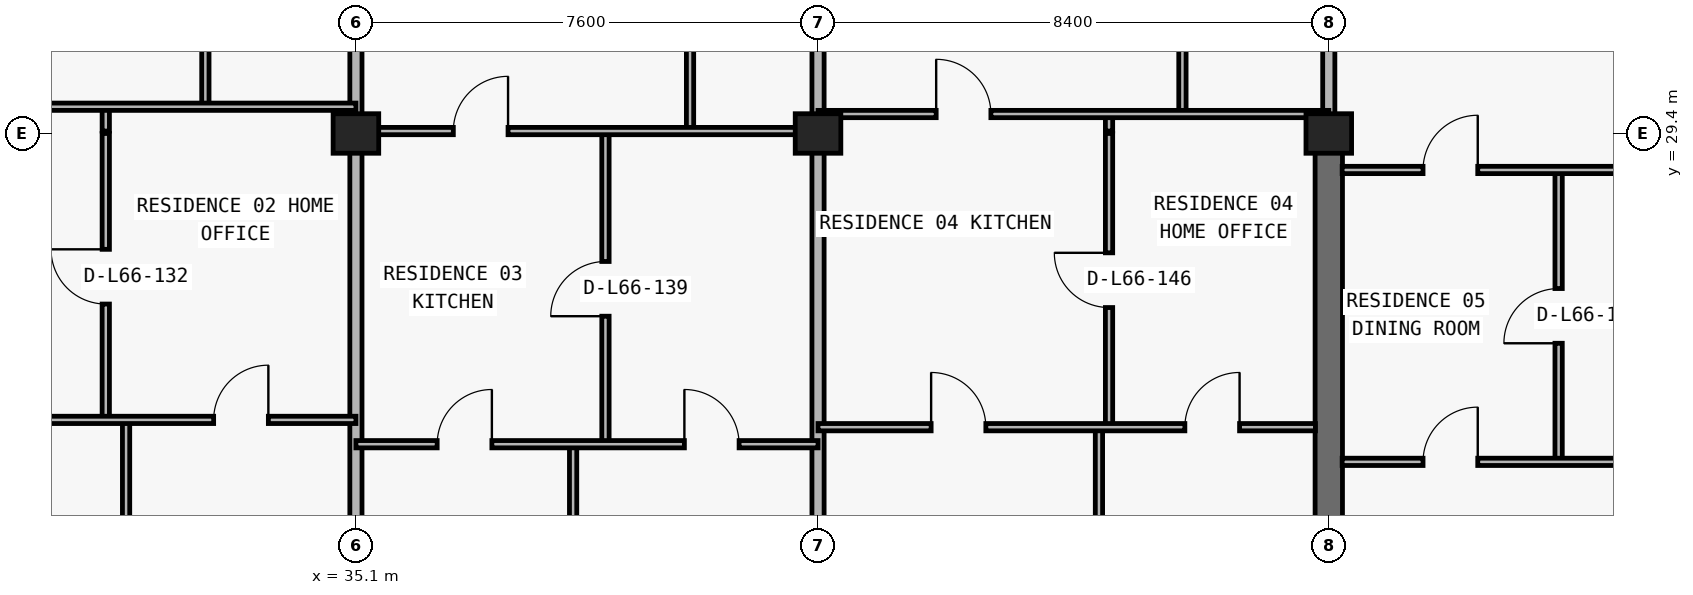
"""IFC4 building model, lengths in metres.
Left out: names, types, materials, properties, quantities, classifications, styles, units other than length and angle.
Written with IfcOpenShell. Run it as: python <this file> out.ifc"""

import sys

from ifc_helpers import new_model, si_unit, direction, frame, frame_2d, origin, origin_2d, place, context, subcontext, project, spatial, rectangle, extrude, element, fill, save


model = new_model("IFC4")
c1 = context("Model", 3, precision=1e-05, world=origin(), true_north=direction((0.0, 1.0)))
c2 = subcontext(c1, "Body", "Model", "MODEL_VIEW")
j1 = project(units=[si_unit("LENGTHUNIT", "METRE"), si_unit("PLANEANGLEUNIT", "RADIAN")], contexts=[c1])
p1 = place(None, origin())
s1 = spatial("IfcSite", under=j1, at=p1, CompositionType="ELEMENT")
p2 = place(p1, origin())
s2 = spatial("IfcBuilding", under=s1, at=p2, CompositionType="ELEMENT")
p3 = place(p2, frame((0.0, 0.0, 236.4)))
s3 = spatial("IfcBuildingStorey", under=s2, at=p3, CompositionType="ELEMENT", Elevation=236.4)
for number, where, z_axis, x_axis in (
    (1, (35.1, 29.4, 0.0), (0.0, 0.0, 1.0), (1.0, 0.0, 0.0)),
    (2, (42.7, 29.4, 0.0), (0.0, 0.0, 1.0), (1.0, 0.0, 0.0)),
    (3, (51.1, 29.4, 0.0), (0.0, 0.0, 1.0), (1.0, 0.0, 0.0)),
):
    element("IfcColumn", number, at=place(p3, frame(where, z_axis=z_axis, x_axis=x_axis)), inside=s3, PredefinedType="COLUMN", context=c2, shape_type="SweptSolid", body=[
        extrude(rectangle(XDim=0.75, YDim=0.65, at=origin_2d()), origin(), (0.0, 0.0, 1.0), 3.05),
    ])
p4 = place(p3, frame((51.1, 20.8, 0.0), z_axis=(0.0, 0.0, 1.0), x_axis=(0.0, 1.0, 0.0)))
e4 = element("IfcWall", 4, at=p4, inside=s3, PredefinedType="SHEAR", context=c2, shape_type="SweptSolid", body=[
    extrude(rectangle(XDim=8.6, YDim=0.45, at=frame_2d((4.3, 0.0))), origin(), (0.0, 0.0, 1.0), 3.05),
])
p5 = place(p3, frame((30.986, 24.69, 0.0), z_axis=(0.0, 0.0, 1.0), x_axis=(0.0, 1.0, 0.0)))
e5 = element("IfcWall", 5, at=p5, inside=s3, PredefinedType="PARTITIONING", context=c2, shape_type="SweptSolid", body=[
    extrude(rectangle(XDim=4.71, YDim=0.12, at=frame_2d((2.355, 0.0))), origin(), (0.0, 0.0, 1.0), 3.05),
])
p6 = place(p5, frame((1.905, 0.0, 0.0)))
e6 = element("IfcOpeningElement", 6, at=p6, cuts=e5, PredefinedType="OPENING", context=c2, shape_type="SweptSolid", body=[
    extrude(rectangle(XDim=0.9, YDim=2.15, at=frame_2d((0.45, 1.075))), frame((0.0, 0.07, 0.0), z_axis=(0.0, -1.0, 0.0), x_axis=(1.0, 0.0, 0.0)), (0.0, 0.0, 1.0), 0.14),
])
p7 = place(p3, frame((30.986, 29.44, 0.0), z_axis=(0.0, 0.0, 1.0), x_axis=(0.0, 1.0, 0.0)))
e7 = element("IfcWall", 7, at=p7, inside=s3, PredefinedType="PARTITIONING", context=c2, shape_type="SweptSolid", body=[
    extrude(rectangle(XDim=0.4, YDim=0.12, at=frame_2d((0.2, 0.0))), origin(), (0.0, 0.0, 1.0), 2.725),
])
p8 = place(p3, frame((31.32, 13.34, 0.0), z_axis=(0.0, 0.0, 1.0), x_axis=(0.0, 1.0, 0.0)))
e8 = element("IfcWall", 8, at=p8, inside=s3, PredefinedType="PARTITIONING", context=c2, shape_type="SweptSolid", body=[
    extrude(rectangle(XDim=11.35, YDim=0.12, at=frame_2d((5.675, 0.0))), origin(), (0.0, 0.0, 1.0), 3.05),
])
p9 = place(p3, frame((32.624, 29.84, 0.0), z_axis=(0.0, 0.0, 1.0), x_axis=(0.0, 1.0, 0.0)))
e9 = element("IfcWall", 9, at=p9, inside=s3, PredefinedType="PARTITIONING", context=c2, shape_type="SweptSolid", body=[
    extrude(rectangle(XDim=4.16, YDim=0.12, at=frame_2d((2.08, 0.0))), origin(), (0.0, 0.0, 1.0), 3.05),
])
p10 = place(p9, frame((1.655, 0.0, 0.0)))
e10 = element("IfcOpeningElement", 10, at=p10, cuts=e9, PredefinedType="OPENING", context=c2, shape_type="SweptSolid", body=[
    extrude(rectangle(XDim=0.85, YDim=2.1, at=frame_2d((0.425, 1.05))), frame((0.0, 0.07, 0.0), z_axis=(0.0, -1.0, 0.0), x_axis=(1.0, 0.0, 0.0)), (0.0, 0.0, 1.0), 0.14),
])
p11 = place(p3, frame((35.1, 13.34, 0.0), z_axis=(0.0, 0.0, 1.0), x_axis=(0.0, 1.0, 0.0)))
e11 = element("IfcWall", 11, at=p11, inside=s3, PredefinedType="PARTITIONING", context=c2, shape_type="SweptSolid", body=[
    extrude(rectangle(XDim=16.06, YDim=0.2, at=frame_2d((8.03, 0.0))), origin(), (0.0, 0.0, 1.0), 2.263),
])
p12 = place(p3, frame((35.1, 29.44, 0.0), z_axis=(0.0, 0.0, 1.0), x_axis=(0.0, 1.0, 0.0)))
e12 = element("IfcWall", 12, at=p12, inside=s3, PredefinedType="PARTITIONING", context=c2, shape_type="SweptSolid", body=[
    extrude(rectangle(XDim=4.56, YDim=0.2, at=frame_2d((2.28, 0.0))), origin(), (0.0, 0.0, 1.0), 2.263),
])
p13 = place(p3, frame((38.672, 13.34, 0.0), z_axis=(0.0, 0.0, 1.0), x_axis=(0.0, 1.0, 0.0)))
e13 = element("IfcWall", 13, at=p13, inside=s3, PredefinedType="PARTITIONING", context=c2, shape_type="SweptSolid", body=[
    extrude(rectangle(XDim=10.95, YDim=0.12, at=frame_2d((5.475, 0.0))), origin(), (0.0, 0.0, 1.0), 3.05),
])
p14 = place(p3, frame((39.204, 24.29, 0.0), z_axis=(0.0, 0.0, 1.0), x_axis=(0.0, 1.0, 0.0)))
e14 = element("IfcWall", 14, at=p14, inside=s3, PredefinedType="PARTITIONING", context=c2, shape_type="SweptSolid", body=[
    extrude(rectangle(XDim=5.11, YDim=0.12, at=frame_2d((2.555, 0.0))), origin(), (0.0, 0.0, 1.0), 3.05),
])
p15 = place(p14, frame((2.105, 0.0, 0.0)))
e15 = element("IfcOpeningElement", 15, at=p15, cuts=e14, PredefinedType="OPENING", context=c2, shape_type="SweptSolid", body=[
    extrude(rectangle(XDim=0.9, YDim=2.15, at=frame_2d((0.45, 1.075))), frame((0.0, 0.07, 0.0), z_axis=(0.0, -1.0, 0.0), x_axis=(1.0, 0.0, 0.0)), (0.0, 0.0, 1.0), 0.14),
])
p16 = place(p3, frame((40.595, 29.44, 0.0), z_axis=(0.0, 0.0, 1.0), x_axis=(0.0, 1.0, 0.0)))
e16 = element("IfcWall", 16, at=p16, inside=s3, PredefinedType="PARTITIONING", context=c2, shape_type="SweptSolid", body=[
    extrude(rectangle(XDim=4.56, YDim=0.12, at=frame_2d((2.28, 0.0))), origin(), (0.0, 0.0, 1.0), 3.05),
])
p17 = place(p16, frame((1.855, 0.0, 0.0)))
e17 = element("IfcOpeningElement", 17, at=p17, cuts=e16, PredefinedType="OPENING", context=c2, shape_type="SweptSolid", body=[
    extrude(rectangle(XDim=0.85, YDim=2.1, at=frame_2d((0.425, 1.05))), frame((0.0, 0.07, 0.0), z_axis=(0.0, -1.0, 0.0), x_axis=(1.0, 0.0, 0.0)), (0.0, 0.0, 1.0), 0.14),
])
p18 = place(p3, frame((42.7, 13.34, 0.0), z_axis=(0.0, 0.0, 1.0), x_axis=(0.0, 1.0, 0.0)))
e18 = element("IfcWall", 18, at=p18, inside=s3, PredefinedType="PARTITIONING", context=c2, shape_type="SweptSolid", body=[
    extrude(rectangle(XDim=16.06, YDim=0.2, at=frame_2d((8.03, 0.0))), origin(), (0.0, 0.0, 1.0), 2.263),
])
p19 = place(p3, frame((42.7, 29.44, 0.0), z_axis=(0.0, 0.0, 1.0), x_axis=(0.0, 1.0, 0.0)))
e19 = element("IfcWall", 19, at=p19, inside=s3, PredefinedType="PARTITIONING", context=c2, shape_type="SweptSolid", body=[
    extrude(rectangle(XDim=4.56, YDim=0.2, at=frame_2d((2.28, 0.0))), origin(), (0.0, 0.0, 1.0), 2.263),
])
p20 = place(p3, frame((47.32, 13.34, 0.0), z_axis=(0.0, 0.0, 1.0), x_axis=(0.0, 1.0, 0.0)))
e20 = element("IfcWall", 20, at=p20, inside=s3, PredefinedType="PARTITIONING", context=c2, shape_type="SweptSolid", body=[
    extrude(rectangle(XDim=11.23, YDim=0.12, at=frame_2d((5.615, 0.0))), origin(), (0.0, 0.0, 1.0), 3.05),
])
p21 = place(p3, frame((47.486, 24.575, 0.0), z_axis=(0.0, 0.0, 1.0), x_axis=(0.0, 1.0, 0.0)))
e21 = element("IfcWall", 21, at=p21, inside=s3, PredefinedType="PARTITIONING", context=c2, shape_type="SweptSolid", body=[
    extrude(rectangle(XDim=4.825, YDim=0.12, at=frame_2d((2.413, 0.0))), origin(), (0.0, 0.0, 1.0), 3.05),
])
p22 = place(p21, frame((1.962, 0.0, 0.0)))
e22 = element("IfcOpeningElement", 22, at=p22, cuts=e21, PredefinedType="OPENING", context=c2, shape_type="SweptSolid", body=[
    extrude(rectangle(XDim=0.9, YDim=2.15, at=frame_2d((0.45, 1.075))), frame((0.0, 0.07, 0.0), z_axis=(0.0, -1.0, 0.0), x_axis=(1.0, 0.0, 0.0)), (0.0, 0.0, 1.0), 0.14),
])
p23 = place(p3, frame((47.486, 29.44, 0.0), z_axis=(0.0, 0.0, 1.0), x_axis=(0.0, 1.0, 0.0)))
e23 = element("IfcWall", 23, at=p23, inside=s3, PredefinedType="PARTITIONING", context=c2, shape_type="SweptSolid", body=[
    extrude(rectangle(XDim=0.28, YDim=0.12, at=frame_2d((0.14, 0.0))), origin(), (0.0, 0.0, 1.0), 3.05),
])
p24 = place(p3, frame((48.693, 29.72, 0.0), z_axis=(0.0, 0.0, 1.0), x_axis=(0.0, 1.0, 0.0)))
e24 = element("IfcWall", 24, at=p24, inside=s3, PredefinedType="PARTITIONING", context=c2, shape_type="SweptSolid", body=[
    extrude(rectangle(XDim=4.28, YDim=0.12, at=frame_2d((2.14, 0.0))), origin(), (0.0, 0.0, 1.0), 3.05),
])
p25 = place(p24, frame((1.715, 0.0, 0.0)))
e25 = element("IfcOpeningElement", 25, at=p25, cuts=e24, PredefinedType="OPENING", context=c2, shape_type="SweptSolid", body=[
    extrude(rectangle(XDim=0.85, YDim=2.1, at=frame_2d((0.425, 1.05))), frame((0.0, 0.07, 0.0), z_axis=(0.0, -1.0, 0.0), x_axis=(1.0, 0.0, 0.0)), (0.0, 0.0, 1.0), 0.14),
])
p26 = place(p3, frame((51.1, 29.44, 0.0), z_axis=(0.0, 0.0, 1.0), x_axis=(0.0, 1.0, 0.0)))
e26 = element("IfcWall", 26, at=p26, inside=s3, PredefinedType="PARTITIONING", context=c2, shape_type="SweptSolid", body=[
    extrude(rectangle(XDim=4.56, YDim=0.2, at=frame_2d((2.28, 0.0))), origin(), (0.0, 0.0, 1.0), 2.335),
])
p27 = place(p3, frame((54.88, 24.0, 0.0), z_axis=(0.0, 0.0, 1.0), x_axis=(0.0, 1.0, 0.0)))
e27 = element("IfcWall", 27, at=p27, inside=s3, PredefinedType="PARTITIONING", context=c2, shape_type="SweptSolid", body=[
    extrude(rectangle(XDim=4.8, YDim=0.12, at=frame_2d((2.4, 0.0))), origin(), (0.0, 0.0, 1.0), 3.05),
])
p28 = place(p27, frame((1.95, 0.0, 0.0)))
e28 = element("IfcOpeningElement", 28, at=p28, cuts=e27, PredefinedType="OPENING", context=c2, shape_type="SweptSolid", body=[
    extrude(rectangle(XDim=0.9, YDim=2.15, at=frame_2d((0.45, 1.075))), frame((0.0, 0.07, 0.0), z_axis=(0.0, -1.0, 0.0), x_axis=(1.0, 0.0, 0.0)), (0.0, 0.0, 1.0), 0.14),
])
p29 = place(p3, frame((51.32, 24.0, 0.0), z_axis=(0.0, 0.0, 1.0), x_axis=(1.0, 0.0, 0.0)))
e29 = element("IfcWall", 29, at=p29, inside=s3, PredefinedType="PARTITIONING", context=c2, shape_type="SweptSolid", body=[
    extrude(rectangle(XDim=8.18, YDim=0.12, at=frame_2d((4.09, 0.0))), origin(), (0.0, 0.0, 1.0), 3.05),
])
p30 = place(p29, frame((1.33, 0.0, 0.0)))
e30 = element("IfcOpeningElement", 30, at=p30, cuts=e29, PredefinedType="OPENING", context=c2, shape_type="SweptSolid", body=[
    extrude(rectangle(XDim=0.9, YDim=2.15, at=frame_2d((0.45, 1.075))), frame((0.0, 0.07, 0.0), z_axis=(0.0, -1.0, 0.0), x_axis=(1.0, 0.0, 0.0)), (0.0, 0.0, 1.0), 0.14),
])
p31 = place(p3, frame((35.1, 24.29, 0.0), z_axis=(0.0, 0.0, 1.0), x_axis=(1.0, 0.0, 0.0)))
e31 = element("IfcWall", 31, at=p31, inside=s3, PredefinedType="PARTITIONING", context=c2, shape_type="SweptSolid", body=[
    extrude(rectangle(XDim=7.6, YDim=0.12, at=frame_2d((3.8, 0.0))), origin(), (0.0, 0.0, 1.0), 3.05),
])
p32 = place(p31, frame((1.336, 0.0, 0.0)))
e32 = element("IfcOpeningElement", 32, at=p32, cuts=e31, PredefinedType="OPENING", context=c2, shape_type="SweptSolid", body=[
    extrude(rectangle(XDim=0.9, YDim=2.15, at=frame_2d((0.45, 1.075))), frame((0.0, 0.07, 0.0), z_axis=(0.0, -1.0, 0.0), x_axis=(1.0, 0.0, 0.0)), (0.0, 0.0, 1.0), 0.14),
])
p33 = place(p31, frame((5.402, 0.0, 0.0)))
e33 = element("IfcOpeningElement", 33, at=p33, cuts=e31, PredefinedType="OPENING", context=c2, shape_type="SweptSolid", body=[
    extrude(rectangle(XDim=0.9, YDim=2.15, at=frame_2d((0.45, 1.075))), frame((0.0, 0.07, 0.0), z_axis=(0.0, -1.0, 0.0), x_axis=(1.0, 0.0, 0.0)), (0.0, 0.0, 1.0), 0.14),
])
p34 = place(p3, frame((42.7, 24.57, 0.0), z_axis=(0.0, 0.0, 1.0), x_axis=(1.0, 0.0, 0.0)))
e34 = element("IfcWall", 34, at=p34, inside=s3, PredefinedType="PARTITIONING", context=c2, shape_type="SweptSolid", body=[
    extrude(rectangle(XDim=8.18, YDim=0.12, at=frame_2d((4.09, 0.0))), origin(), (0.0, 0.0, 1.0), 3.05),
])
p35 = place(p34, frame((1.86, 0.0, 0.0)))
e35 = element("IfcOpeningElement", 35, at=p35, cuts=e34, PredefinedType="OPENING", context=c2, shape_type="SweptSolid", body=[
    extrude(rectangle(XDim=0.9, YDim=2.15, at=frame_2d((0.45, 1.075))), frame((0.0, 0.07, 0.0), z_axis=(0.0, -1.0, 0.0), x_axis=(1.0, 0.0, 0.0)), (0.0, 0.0, 1.0), 0.14),
])
p36 = place(p34, frame((6.033, 0.0, 0.0)))
e36 = element("IfcOpeningElement", 36, at=p36, cuts=e34, PredefinedType="OPENING", context=c2, shape_type="SweptSolid", body=[
    extrude(rectangle(XDim=0.9, YDim=2.15, at=frame_2d((0.45, 1.075))), frame((0.0, 0.07, 0.0), z_axis=(0.0, -1.0, 0.0), x_axis=(1.0, 0.0, 0.0)), (0.0, 0.0, 1.0), 0.14),
])
p37 = place(p3, frame((26.92, 24.69, 0.0), z_axis=(0.0, 0.0, 1.0), x_axis=(1.0, 0.0, 0.0)))
e37 = element("IfcWall", 37, at=p37, inside=s3, PredefinedType="PARTITIONING", context=c2, shape_type="SweptSolid", body=[
    extrude(rectangle(XDim=8.18, YDim=0.12, at=frame_2d((4.09, 0.0))), origin(), (0.0, 0.0, 1.0), 3.05),
])
p38 = place(p37, frame((1.583, 0.0, 0.0)))
e38 = element("IfcOpeningElement", 38, at=p38, cuts=e37, PredefinedType="OPENING", context=c2, shape_type="SweptSolid", body=[
    extrude(rectangle(XDim=0.9, YDim=2.15, at=frame_2d((0.45, 1.075))), frame((0.0, 0.07, 0.0), z_axis=(0.0, -1.0, 0.0), x_axis=(1.0, 0.0, 0.0)), (0.0, 0.0, 1.0), 0.14),
])
p39 = place(p37, frame((5.84, 0.0, 0.0)))
e39 = element("IfcOpeningElement", 39, at=p39, cuts=e37, PredefinedType="OPENING", context=c2, shape_type="SweptSolid", body=[
    extrude(rectangle(XDim=0.9, YDim=2.15, at=frame_2d((0.45, 1.075))), frame((0.0, 0.07, 0.0), z_axis=(0.0, -1.0, 0.0), x_axis=(1.0, 0.0, 0.0)), (0.0, 0.0, 1.0), 0.14),
])
p40 = place(p3, frame((51.32, 28.8, 0.0), z_axis=(0.0, 0.0, 1.0), x_axis=(1.0, 0.0, 0.0)))
e40 = element("IfcWall", 40, at=p40, inside=s3, PredefinedType="PARTITIONING", context=c2, shape_type="SweptSolid", body=[
    extrude(rectangle(XDim=8.175, YDim=0.12, at=frame_2d((4.087, 0.0))), origin(), (0.0, 0.0, 1.0), 3.05),
])
p41 = place(p40, frame((1.33, 0.0, 0.0)))
e41 = element("IfcOpeningElement", 41, at=p41, cuts=e40, PredefinedType="OPENING", context=c2, shape_type="SweptSolid", body=[
    extrude(rectangle(XDim=0.9, YDim=2.15, at=frame_2d((0.45, 1.075))), frame((0.0, 0.07, 0.0), z_axis=(0.0, -1.0, 0.0), x_axis=(1.0, 0.0, 0.0)), (0.0, 0.0, 1.0), 0.14),
])
p42 = place(p3, frame((35.1, 29.44, 0.0), z_axis=(0.0, 0.0, 1.0), x_axis=(1.0, 0.0, 0.0)))
e42 = element("IfcWall", 42, at=p42, inside=s3, PredefinedType="PARTITIONING", context=c2, shape_type="SweptSolid", body=[
    extrude(rectangle(XDim=7.6, YDim=0.12, at=frame_2d((3.8, 0.0))), origin(), (0.0, 0.0, 1.0), 2.263),
])
p43 = place(p42, frame((1.602, 0.0, 0.0)))
e43 = element("IfcOpeningElement", 43, at=p43, cuts=e42, PredefinedType="OPENING", context=c2, shape_type="SweptSolid", body=[
    extrude(rectangle(XDim=0.9, YDim=2.15, at=frame_2d((0.45, 1.075))), frame((0.0, 0.07, 0.0), z_axis=(0.0, -1.0, 0.0), x_axis=(1.0, 0.0, 0.0)), (0.0, 0.0, 1.0), 0.14),
])
p44 = place(p3, frame((42.7, 29.72, 0.0), z_axis=(0.0, 0.0, 1.0), x_axis=(1.0, 0.0, 0.0)))
e44 = element("IfcWall", 44, at=p44, inside=s3, PredefinedType="PARTITIONING", context=c2, shape_type="SweptSolid", body=[
    extrude(rectangle(XDim=8.4, YDim=0.12, at=frame_2d((4.2, 0.0))), origin(), (0.0, 0.0, 1.0), 2.263),
])
p45 = place(p44, frame((1.943, 0.0, 0.0)))
e45 = element("IfcOpeningElement", 45, at=p45, cuts=e44, PredefinedType="OPENING", context=c2, shape_type="SweptSolid", body=[
    extrude(rectangle(XDim=0.9, YDim=2.15, at=frame_2d((0.45, 1.075))), frame((0.0, 0.07, 0.0), z_axis=(0.0, -1.0, 0.0), x_axis=(1.0, 0.0, 0.0)), (0.0, 0.0, 1.0), 0.14),
])
p46 = place(p3, frame((26.7, 29.84, 0.0), z_axis=(0.0, 0.0, 1.0), x_axis=(1.0, 0.0, 0.0)))
e46 = element("IfcWall", 46, at=p46, inside=s3, PredefinedType="PARTITIONING", context=c2, shape_type="SweptSolid", body=[
    extrude(rectangle(XDim=8.4, YDim=0.12, at=frame_2d((4.2, 0.0))), origin(), (0.0, 0.0, 1.0), 3.05),
])
p47 = place(p46, frame((1.693, 0.0, 0.0)))
e47 = element("IfcOpeningElement", 47, at=p47, cuts=e46, PredefinedType="OPENING", context=c2, shape_type="SweptSolid", body=[
    extrude(rectangle(XDim=0.9, YDim=2.15, at=frame_2d((0.45, 1.075))), frame((0.0, 0.07, 0.0), z_axis=(0.0, -1.0, 0.0), x_axis=(1.0, 0.0, 0.0)), (0.0, 0.0, 1.0), 0.14),
])
p48 = place(p6, origin())
e48 = element("IfcDoor", 48, at=p48, inside=s3, OperationType="SINGLE_SWING_RIGHT", PredefinedType="DOOR", context=c2, shape_type="SweptSolid", body=[
    extrude(rectangle(XDim=0.9, YDim=2.15, at=frame_2d((0.45, 1.075))), frame((0.0, 0.025, 0.0), z_axis=(0.0, -1.0, 0.0), x_axis=(1.0, 0.0, 0.0)), (0.0, 0.0, 1.0), 0.05),
])
fill(e6, e48)
p49 = place(p39, origin())
e49 = element("IfcDoor", 49, at=p49, inside=s3, OperationType="SINGLE_SWING_RIGHT", PredefinedType="DOOR", context=c2, shape_type="SweptSolid", body=[
    extrude(rectangle(XDim=0.9, YDim=2.15, at=frame_2d((0.45, 1.075))), frame((0.0, 0.025, 0.0), z_axis=(0.0, -1.0, 0.0), x_axis=(1.0, 0.0, 0.0)), (0.0, 0.0, 1.0), 0.05),
])
fill(e39, e49)
p50 = place(p43, origin())
e50 = element("IfcDoor", 50, at=p50, inside=s3, OperationType="SINGLE_SWING_RIGHT", PredefinedType="DOOR", context=c2, shape_type="SweptSolid", body=[
    extrude(rectangle(XDim=0.9, YDim=2.15, at=frame_2d((0.45, 1.075))), frame((0.0, 0.025, 0.0), z_axis=(0.0, -1.0, 0.0), x_axis=(1.0, 0.0, 0.0)), (0.0, 0.0, 1.0), 0.05),
])
fill(e43, e50)
p51 = place(p15, origin())
e51 = element("IfcDoor", 51, at=p51, inside=s3, OperationType="SINGLE_SWING_LEFT", PredefinedType="DOOR", context=c2, shape_type="SweptSolid", body=[
    extrude(rectangle(XDim=0.9, YDim=2.15, at=frame_2d((0.45, 1.075))), frame((0.0, 0.025, 0.0), z_axis=(0.0, -1.0, 0.0), x_axis=(1.0, 0.0, 0.0)), (0.0, 0.0, 1.0), 0.05),
])
fill(e15, e51)
p52 = place(p32, origin())
e52 = element("IfcDoor", 52, at=p52, inside=s3, OperationType="SINGLE_SWING_RIGHT", PredefinedType="DOOR", context=c2, shape_type="SweptSolid", body=[
    extrude(rectangle(XDim=0.9, YDim=2.15, at=frame_2d((0.45, 1.075))), frame((0.0, 0.025, 0.0), z_axis=(0.0, -1.0, 0.0), x_axis=(1.0, 0.0, 0.0)), (0.0, 0.0, 1.0), 0.05),
])
fill(e32, e52)
p53 = place(p33, origin())
e53 = element("IfcDoor", 53, at=p53, inside=s3, OperationType="SINGLE_SWING_LEFT", PredefinedType="DOOR", context=c2, shape_type="SweptSolid", body=[
    extrude(rectangle(XDim=0.9, YDim=2.15, at=frame_2d((0.45, 1.075))), frame((0.0, 0.025, 0.0), z_axis=(0.0, -1.0, 0.0), x_axis=(1.0, 0.0, 0.0)), (0.0, 0.0, 1.0), 0.05),
])
fill(e33, e53)
p54 = place(p45, origin())
e54 = element("IfcDoor", 54, at=p54, inside=s3, OperationType="SINGLE_SWING_LEFT", PredefinedType="DOOR", context=c2, shape_type="SweptSolid", body=[
    extrude(rectangle(XDim=0.9, YDim=2.15, at=frame_2d((0.45, 1.075))), frame((0.0, 0.025, 0.0), z_axis=(0.0, -1.0, 0.0), x_axis=(1.0, 0.0, 0.0)), (0.0, 0.0, 1.0), 0.05),
])
fill(e45, e54)
p55 = place(p22, origin())
e55 = element("IfcDoor", 55, at=p55, inside=s3, OperationType="SINGLE_SWING_RIGHT", PredefinedType="DOOR", context=c2, shape_type="SweptSolid", body=[
    extrude(rectangle(XDim=0.9, YDim=2.15, at=frame_2d((0.45, 1.075))), frame((0.0, 0.025, 0.0), z_axis=(0.0, -1.0, 0.0), x_axis=(1.0, 0.0, 0.0)), (0.0, 0.0, 1.0), 0.05),
])
fill(e22, e55)
p56 = place(p35, origin())
e56 = element("IfcDoor", 56, at=p56, inside=s3, OperationType="SINGLE_SWING_LEFT", PredefinedType="DOOR", context=c2, shape_type="SweptSolid", body=[
    extrude(rectangle(XDim=0.9, YDim=2.15, at=frame_2d((0.45, 1.075))), frame((0.0, 0.025, 0.0), z_axis=(0.0, -1.0, 0.0), x_axis=(1.0, 0.0, 0.0)), (0.0, 0.0, 1.0), 0.05),
])
fill(e35, e56)
p57 = place(p36, origin())
e57 = element("IfcDoor", 57, at=p57, inside=s3, OperationType="SINGLE_SWING_RIGHT", PredefinedType="DOOR", context=c2, shape_type="SweptSolid", body=[
    extrude(rectangle(XDim=0.9, YDim=2.15, at=frame_2d((0.45, 1.075))), frame((0.0, 0.025, 0.0), z_axis=(0.0, -1.0, 0.0), x_axis=(1.0, 0.0, 0.0)), (0.0, 0.0, 1.0), 0.05),
])
fill(e36, e57)
p58 = place(p41, origin())
e58 = element("IfcDoor", 58, at=p58, inside=s3, OperationType="SINGLE_SWING_RIGHT", PredefinedType="DOOR", context=c2, shape_type="SweptSolid", body=[
    extrude(rectangle(XDim=0.9, YDim=2.15, at=frame_2d((0.45, 1.075))), frame((0.0, 0.025, 0.0), z_axis=(0.0, -1.0, 0.0), x_axis=(1.0, 0.0, 0.0)), (0.0, 0.0, 1.0), 0.05),
])
fill(e41, e58)
p59 = place(p28, origin())
e59 = element("IfcDoor", 59, at=p59, inside=s3, OperationType="SINGLE_SWING_LEFT", PredefinedType="DOOR", context=c2, shape_type="SweptSolid", body=[
    extrude(rectangle(XDim=0.9, YDim=2.15, at=frame_2d((0.45, 1.075))), frame((0.0, 0.025, 0.0), z_axis=(0.0, -1.0, 0.0), x_axis=(1.0, 0.0, 0.0)), (0.0, 0.0, 1.0), 0.05),
])
fill(e28, e59)
p60 = place(p30, origin())
e60 = element("IfcDoor", 60, at=p60, inside=s3, OperationType="SINGLE_SWING_RIGHT", PredefinedType="DOOR", context=c2, shape_type="SweptSolid", body=[
    extrude(rectangle(XDim=0.9, YDim=2.15, at=frame_2d((0.45, 1.075))), frame((0.0, 0.025, 0.0), z_axis=(0.0, -1.0, 0.0), x_axis=(1.0, 0.0, 0.0)), (0.0, 0.0, 1.0), 0.05),
])
fill(e30, e60)
save(model, sys.argv[1])
